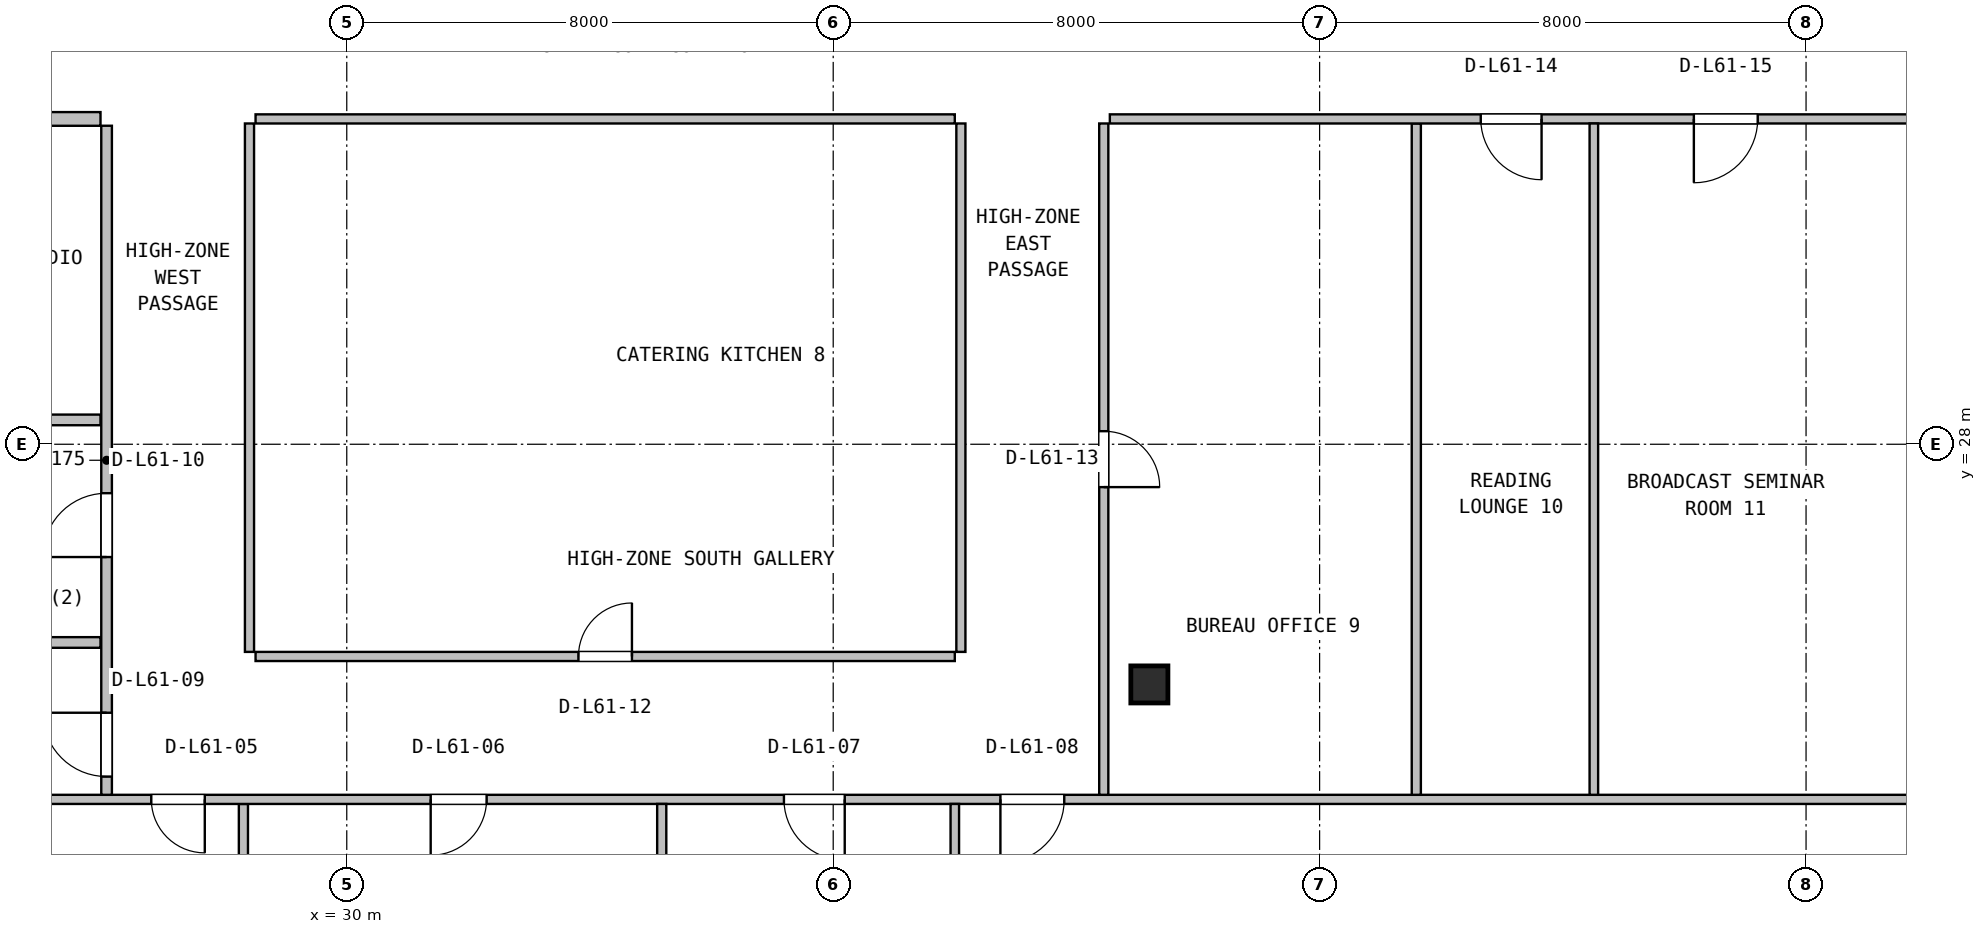
"""IFC4 building model, lengths in metres.
Left out: names, types, materials, properties, quantities, classifications, styles, units other than length and angle.
Written with IfcOpenShell. Run it as: python <this file> out.ifc"""

import sys

from ifc_helpers import new_model, si_unit, direction, frame, frame_2d, origin, origin_2d, place, context, subcontext, project, spatial, rectangle, hollow_circle, extrude, source, transform, mapped, element, fill, save


model = new_model("IFC4")
c1 = context("Model", 3, precision=1e-05, world=origin(), true_north=direction((0.0, 1.0)))
c2 = subcontext(c1, "Body", "Model", "MODEL_VIEW")
j1 = project(units=[si_unit("LENGTHUNIT", "METRE"), si_unit("PLANEANGLEUNIT", "RADIAN")], contexts=[c1])
p1 = place(None, origin())
s1 = spatial("IfcSite", under=j1, at=p1, CompositionType="ELEMENT")
p2 = place(p1, origin())
s2 = spatial("IfcBuilding", under=s1, at=p2, CompositionType="ELEMENT")
p3 = place(p2, frame((0.0, 0.0, 247.0)))
s3 = spatial("IfcBuildingStorey", under=s2, at=p3, CompositionType="ELEMENT", Elevation=247.0)
m1 = source(origin(), c2, "Body", "SweptSolid", [
    extrude(hollow_circle(Radius=0.305, WallThickness=0.025, at=origin_2d()), origin(), (0.0, 0.0, 1.0), 3.8),
])
p4 = place(p3, frame((43.2, 24.05, 0.0), z_axis=(0.0, 0.0, 1.0), x_axis=(1.0, 0.0, 0.0)))
e1 = element("IfcColumn", 1, at=p4, inside=s3, PredefinedType="COLUMN", context=c2, shape_type="MappedRepresentation", body=[
    mapped(m1, transform((0.0, 0.0, 0.0), x_axis=(1.0, 0.0, 0.0), y_axis=(0.0, 1.0, 0.0), z_axis=(0.0, 0.0, 1.0), scale=1.0)),
])
p5 = place(p3, frame((28.3, 10.38, 0.0), z_axis=(0.0, 0.0, 1.0), x_axis=(0.0, 1.0, 0.0)))
e2 = element("IfcWall", 2, at=p5, inside=s3, PredefinedType="PARTITIONING", context=c2, shape_type="SweptSolid", body=[
    extrude(rectangle(XDim=11.705, YDim=0.15, at=frame_2d((5.853, 0.0))), origin(), (0.0, 0.0, 1.0), 2.908),
])
p6 = place(p3, frame((9.68, 22.16, 0.0), z_axis=(0.0, 0.0, 1.0), x_axis=(1.0, 0.0, 0.0)))
e3 = element("IfcWall", 3, at=p6, inside=s3, PredefinedType="PARTITIONING", context=c2, shape_type="SweptSolid", body=[
    extrude(rectangle(XDim=48.64, YDim=0.15, at=frame_2d((24.32, 0.0))), origin(), (0.0, 0.0, 1.0), 2.908),
])
p7 = place(p6, frame((17.105, 0.0, 0.0)))
e4 = element("IfcOpeningElement", 4, at=p7, cuts=e3, PredefinedType="OPENING", context=c2, shape_type="SweptSolid", body=[
    extrude(rectangle(XDim=0.88, YDim=2.06, at=frame_2d((0.44, 1.03))), frame((0.0, 0.085, 0.0), z_axis=(0.0, -1.0, 0.0), x_axis=(1.0, 0.0, 0.0)), (0.0, 0.0, 1.0), 0.17),
])
p8 = place(p6, frame((21.7, 0.0, 0.0)))
e5 = element("IfcOpeningElement", 5, at=p8, cuts=e3, PredefinedType="OPENING", context=c2, shape_type="SweptSolid", body=[
    extrude(rectangle(XDim=0.92, YDim=2.08, at=frame_2d((0.46, 1.04))), frame((0.0, 0.085, 0.0), z_axis=(0.0, -1.0, 0.0), x_axis=(1.0, 0.0, 0.0)), (0.0, 0.0, 1.0), 0.17),
])
p9 = place(p6, frame((27.51, 0.0, 0.0)))
e6 = element("IfcOpeningElement", 6, at=p9, cuts=e3, PredefinedType="OPENING", context=c2, shape_type="SweptSolid", body=[
    extrude(rectangle(XDim=1.0, YDim=2.1, at=frame_2d((0.5, 1.05))), frame((0.0, 0.085, 0.0), z_axis=(0.0, -1.0, 0.0), x_axis=(1.0, 0.0, 0.0)), (0.0, 0.0, 1.0), 0.17),
])
p10 = place(p6, frame((31.07, 0.0, 0.0)))
e7 = element("IfcOpeningElement", 7, at=p10, cuts=e3, PredefinedType="OPENING", context=c2, shape_type="SweptSolid", body=[
    extrude(rectangle(XDim=1.05, YDim=2.1, at=frame_2d((0.525, 1.05))), frame((0.0, 0.085, 0.0), z_axis=(0.0, -1.0, 0.0), x_axis=(1.0, 0.0, 0.0)), (0.0, 0.0, 1.0), 0.17),
])
p11 = place(p3, frame((35.18, 10.38, 0.0), z_axis=(0.0, 0.0, 1.0), x_axis=(0.0, 1.0, 0.0)))
e8 = element("IfcWall", 8, at=p11, inside=s3, PredefinedType="PARTITIONING", context=c2, shape_type="SweptSolid", body=[
    extrude(rectangle(XDim=11.705, YDim=0.15, at=frame_2d((5.853, 0.0))), origin(), (0.0, 0.0, 1.0), 3.171),
])
p12 = place(p3, frame((40.0, 10.38, 0.0), z_axis=(0.0, 0.0, 1.0), x_axis=(0.0, 1.0, 0.0)))
e9 = element("IfcWall", 9, at=p12, inside=s3, PredefinedType="PARTITIONING", context=c2, shape_type="SweptSolid", body=[
    extrude(rectangle(XDim=11.705, YDim=0.14, at=frame_2d((5.853, 0.0))), origin(), (0.0, 0.0, 1.0), 3.171),
])
p13 = place(p3, frame((26.05, 22.235, 0.0), z_axis=(0.0, 0.0, 1.0), x_axis=(0.0, 1.0, 0.0)))
e10 = element("IfcWall", 10, at=p13, inside=s3, PredefinedType="PARTITIONING", context=c2, shape_type="SweptSolid", body=[
    extrude(rectangle(XDim=11.003, YDim=0.175, at=frame_2d((5.501, 0.0))), origin(), (0.0, 0.0, 1.0), 2.908),
])
p14 = place(p13, frame((0.3, 0.0, 0.0)))
e11 = element("IfcOpeningElement", 11, at=p14, cuts=e10, PredefinedType="OPENING", context=c2, shape_type="SweptSolid", body=[
    extrude(rectangle(XDim=1.05, YDim=2.1, at=frame_2d((0.525, 1.05))), frame((0.0, 0.098, 0.0), z_axis=(0.0, -1.0, 0.0), x_axis=(1.0, 0.0, 0.0)), (0.0, 0.0, 1.0), 0.195),
])
p15 = place(p13, frame((3.91, 0.0, 0.0)))
e12 = element("IfcOpeningElement", 12, at=p15, cuts=e10, PredefinedType="OPENING", context=c2, shape_type="SweptSolid", body=[
    extrude(rectangle(XDim=1.05, YDim=2.1, at=frame_2d((0.525, 1.05))), frame((0.0, 0.098, 0.0), z_axis=(0.0, -1.0, 0.0), x_axis=(1.0, 0.0, 0.0)), (0.0, 0.0, 1.0), 0.195),
])
for number, where, z_axis, x_axis in (
    (13, (9.68, 24.74, 0.0), (0.0, 0.0, 1.0), (1.0, 0.0, 0.0)),
    (14, (9.68, 28.4, 0.0), (0.0, 0.0, 1.0), (1.0, 0.0, 0.0)),
):
    element("IfcWall", number, at=place(p3, frame(where, z_axis=z_axis, x_axis=x_axis)), inside=s3, PredefinedType="PARTITIONING", context=c2, shape_type="SweptSolid", body=[
        extrude(rectangle(XDim=16.27, YDim=0.175, at=frame_2d((8.135, 0.0))), origin(), (0.0, 0.0, 1.0), 2.908),
    ])
p16 = place(p3, frame((9.68, 33.35, 0.0), z_axis=(0.0, 0.0, 1.0), x_axis=(1.0, 0.0, 0.0)))
e15 = element("IfcWall", 15, at=p16, inside=s3, PredefinedType="PARTITIONING", context=c2, shape_type="SweptSolid", body=[
    extrude(rectangle(XDim=16.27, YDim=0.225, at=frame_2d((8.135, 0.0))), origin(), (0.0, 0.0, 1.0), 2.908),
])
p17 = place(p16, frame((9.27, 0.0, 0.0)))
e16 = element("IfcOpeningElement", 16, at=p17, cuts=e15, PredefinedType="OPENING", context=c2, shape_type="SweptSolid", body=[
    extrude(rectangle(XDim=1.4, YDim=2.12, at=frame_2d((0.7, 1.06))), frame((0.0, 0.123, 0.0), z_axis=(0.0, -1.0, 0.0), x_axis=(1.0, 0.0, 0.0)), (0.0, 0.0, 1.0), 0.245),
])
p18 = place(p3, frame((28.5, 24.51, 0.0), z_axis=(0.0, 0.0, 1.0), x_axis=(1.0, 0.0, 0.0)))
e17 = element("IfcWall", 17, at=p18, inside=s3, PredefinedType="PARTITIONING", context=c2, shape_type="SweptSolid", body=[
    extrude(rectangle(XDim=11.5, YDim=0.15, at=frame_2d((5.75, 0.0))), origin(), (0.0, 0.0, 1.0), 2.908),
])
p19 = place(p18, frame((5.31, 0.0, 0.0)))
e18 = element("IfcOpeningElement", 18, at=p19, cuts=e17, PredefinedType="OPENING", context=c2, shape_type="SweptSolid", body=[
    extrude(rectangle(XDim=0.88, YDim=2.06, at=frame_2d((0.44, 1.03))), frame((0.0, 0.085, 0.0), z_axis=(0.0, -1.0, 0.0), x_axis=(1.0, 0.0, 0.0)), (0.0, 0.0, 1.0), 0.17),
])
p20 = place(p3, frame((40.1, 24.585, 0.0), z_axis=(0.0, 0.0, 1.0), x_axis=(0.0, 1.0, 0.0)))
e19 = element("IfcWall", 19, at=p20, inside=s3, PredefinedType="PARTITIONING", context=c2, shape_type="SweptSolid", body=[
    extrude(rectangle(XDim=8.69, YDim=0.15, at=frame_2d((4.345, 0.0))), origin(), (0.0, 0.0, 1.0), 3.222),
])
p21 = place(p3, frame((28.5, 33.35, 0.0), z_axis=(0.0, 0.0, 1.0), x_axis=(1.0, 0.0, 0.0)))
e20 = element("IfcWall", 20, at=p21, inside=s3, PredefinedType="PARTITIONING", context=c2, shape_type="SweptSolid", body=[
    extrude(rectangle(XDim=11.5, YDim=0.15, at=frame_2d((5.75, 0.0))), origin(), (0.0, 0.0, 1.0), 2.908),
])
p22 = place(p3, frame((28.4, 24.585, 0.0), z_axis=(0.0, 0.0, 1.0), x_axis=(0.0, 1.0, 0.0)))
e21 = element("IfcWall", 21, at=p22, inside=s3, PredefinedType="PARTITIONING", context=c2, shape_type="SweptSolid", body=[
    extrude(rectangle(XDim=8.69, YDim=0.15, at=frame_2d((4.345, 0.0))), origin(), (0.0, 0.0, 1.0), 3.222),
])
p23 = place(p3, frame((47.59, 22.235, 0.0), z_axis=(0.0, 0.0, 1.0), x_axis=(0.0, 1.0, 0.0)))
e22 = element("IfcWall", 22, at=p23, inside=s3, PredefinedType="PARTITIONING", context=c2, shape_type="SweptSolid", body=[
    extrude(rectangle(XDim=11.04, YDim=0.15, at=frame_2d((5.52, 0.0))), origin(), (0.0, 0.0, 1.0), 3.222),
])
p24 = place(p3, frame((42.55, 33.35, 0.0), z_axis=(0.0, 0.0, 1.0), x_axis=(1.0, 0.0, 0.0)))
e23 = element("IfcWall", 23, at=p24, inside=s3, PredefinedType="PARTITIONING", context=c2, shape_type="SweptSolid", body=[
    extrude(rectangle(XDim=15.77, YDim=0.15, at=frame_2d((7.885, 0.0))), origin(), (0.0, 0.0, 1.0), 2.908),
])
p25 = place(p24, frame((6.1, 0.0, 0.0)))
e24 = element("IfcOpeningElement", 24, at=p25, cuts=e23, PredefinedType="OPENING", context=c2, shape_type="SweptSolid", body=[
    extrude(rectangle(XDim=1.0, YDim=2.1, at=frame_2d((0.5, 1.05))), frame((0.0, 0.085, 0.0), z_axis=(0.0, -1.0, 0.0), x_axis=(1.0, 0.0, 0.0)), (0.0, 0.0, 1.0), 0.17),
])
p26 = place(p24, frame((9.605, 0.0, 0.0)))
e25 = element("IfcOpeningElement", 25, at=p26, cuts=e23, PredefinedType="OPENING", context=c2, shape_type="SweptSolid", body=[
    extrude(rectangle(XDim=1.05, YDim=2.1, at=frame_2d((0.525, 1.05))), frame((0.0, 0.085, 0.0), z_axis=(0.0, -1.0, 0.0), x_axis=(1.0, 0.0, 0.0)), (0.0, 0.0, 1.0), 0.17),
])
p27 = place(p3, frame((42.45, 22.235, 0.0), z_axis=(0.0, 0.0, 1.0), x_axis=(0.0, 1.0, 0.0)))
e26 = element("IfcWall", 26, at=p27, inside=s3, PredefinedType="PARTITIONING", context=c2, shape_type="SweptSolid", body=[
    extrude(rectangle(XDim=11.04, YDim=0.15, at=frame_2d((5.52, 0.0))), origin(), (0.0, 0.0, 1.0), 2.908),
])
p28 = place(p27, frame((5.06, 0.0, 0.0)))
e27 = element("IfcOpeningElement", 27, at=p28, cuts=e26, PredefinedType="OPENING", context=c2, shape_type="SweptSolid", body=[
    extrude(rectangle(XDim=0.92, YDim=2.08, at=frame_2d((0.46, 1.04))), frame((0.0, 0.085, 0.0), z_axis=(0.0, -1.0, 0.0), x_axis=(1.0, 0.0, 0.0)), (0.0, 0.0, 1.0), 0.17),
])
p29 = place(p3, frame((50.51, 22.235, 0.0), z_axis=(0.0, 0.0, 1.0), x_axis=(0.0, 1.0, 0.0)))
e28 = element("IfcWall", 28, at=p29, inside=s3, PredefinedType="PARTITIONING", context=c2, shape_type="SweptSolid", body=[
    extrude(rectangle(XDim=11.04, YDim=0.14, at=frame_2d((5.52, 0.0))), origin(), (0.0, 0.0, 1.0), 3.222),
])
m2 = source(origin(), c2, "Body", "SweptSolid", [
    extrude(rectangle(XDim=0.88, YDim=2.06, at=frame_2d((0.44, 1.03))), frame((0.0, 0.025, 0.0), z_axis=(0.0, -1.0, 0.0), x_axis=(1.0, 0.0, 0.0)), (0.0, 0.0, 1.0), 0.05),
])
p30 = place(p7, frame((0.88, 0.0, 0.0), z_axis=(0.0, 0.0, 1.0), x_axis=(-1.0, 0.0, 0.0)))
e29 = element("IfcDoor", 29, at=p30, inside=s3, OperationType="SINGLE_SWING_RIGHT", PredefinedType="DOOR", context=c2, shape_type="MappedRepresentation", body=[
    mapped(m2, transform((0.0, 0.0, 0.0), x_axis=(1.0, 0.0, 0.0), y_axis=(0.0, 1.0, 0.0), z_axis=(0.0, 0.0, 1.0), scale=1.0)),
])
fill(e4, e29)
m3 = source(origin(), c2, "Body", "SweptSolid", [
    extrude(rectangle(XDim=0.92, YDim=2.08, at=frame_2d((0.46, 1.04))), frame((0.0, 0.025, 0.0), z_axis=(0.0, -1.0, 0.0), x_axis=(1.0, 0.0, 0.0)), (0.0, 0.0, 1.0), 0.05),
])
p31 = place(p8, frame((0.92, 0.0, 0.0), z_axis=(0.0, 0.0, 1.0), x_axis=(-1.0, 0.0, 0.0)))
e30 = element("IfcDoor", 30, at=p31, inside=s3, OperationType="SINGLE_SWING_LEFT", PredefinedType="DOOR", context=c2, shape_type="MappedRepresentation", body=[
    mapped(m3, transform((0.0, 0.0, 0.0), x_axis=(1.0, 0.0, 0.0), y_axis=(0.0, 1.0, 0.0), z_axis=(0.0, 0.0, 1.0), scale=1.0)),
])
fill(e5, e30)
m4 = source(origin(), c2, "Body", "SweptSolid", [
    extrude(rectangle(XDim=1.0, YDim=2.1, at=frame_2d((0.5, 1.05))), frame((0.0, 0.025, 0.0), z_axis=(0.0, -1.0, 0.0), x_axis=(1.0, 0.0, 0.0)), (0.0, 0.0, 1.0), 0.05),
])
p32 = place(p9, frame((1.0, 0.0, 0.0), z_axis=(0.0, 0.0, 1.0), x_axis=(-1.0, 0.0, 0.0)))
e31 = element("IfcDoor", 31, at=p32, inside=s3, OperationType="SINGLE_SWING_RIGHT", PredefinedType="DOOR", context=c2, shape_type="MappedRepresentation", body=[
    mapped(m4, transform((0.0, 0.0, 0.0), x_axis=(1.0, 0.0, 0.0), y_axis=(0.0, 1.0, 0.0), z_axis=(0.0, 0.0, 1.0), scale=1.0)),
])
fill(e6, e31)
m5 = source(origin(), c2, "Body", "SweptSolid", [
    extrude(rectangle(XDim=1.05, YDim=2.1, at=frame_2d((0.525, 1.05))), frame((0.0, 0.025, 0.0), z_axis=(0.0, -1.0, 0.0), x_axis=(1.0, 0.0, 0.0)), (0.0, 0.0, 1.0), 0.05),
])
p33 = place(p10, frame((1.05, 0.0, 0.0), z_axis=(0.0, 0.0, 1.0), x_axis=(-1.0, 0.0, 0.0)))
e32 = element("IfcDoor", 32, at=p33, inside=s3, OperationType="SINGLE_SWING_LEFT", PredefinedType="DOOR", context=c2, shape_type="MappedRepresentation", body=[
    mapped(m5, transform((0.0, 0.0, 0.0), x_axis=(1.0, 0.0, 0.0), y_axis=(0.0, 1.0, 0.0), z_axis=(0.0, 0.0, 1.0), scale=1.0)),
])
fill(e7, e32)
p34 = place(p14, origin())
e33 = element("IfcDoor", 33, at=p34, inside=s3, OperationType="SINGLE_SWING_RIGHT", PredefinedType="DOOR", context=c2, shape_type="MappedRepresentation", body=[
    mapped(m5, transform((0.0, 0.0, 0.0), x_axis=(1.0, 0.0, 0.0), y_axis=(0.0, 1.0, 0.0), z_axis=(0.0, 0.0, 1.0), scale=1.0)),
])
fill(e11, e33)
p35 = place(p15, origin())
e34 = element("IfcDoor", 34, at=p35, inside=s3, OperationType="SINGLE_SWING_LEFT", PredefinedType="DOOR", context=c2, shape_type="MappedRepresentation", body=[
    mapped(m5, transform((0.0, 0.0, 0.0), x_axis=(1.0, 0.0, 0.0), y_axis=(0.0, 1.0, 0.0), z_axis=(0.0, 0.0, 1.0), scale=1.0)),
])
fill(e12, e34)
p36 = place(p19, origin())
e35 = element("IfcDoor", 35, at=p36, inside=s3, OperationType="SINGLE_SWING_RIGHT", PredefinedType="DOOR", context=c2, shape_type="MappedRepresentation", body=[
    mapped(m2, transform((0.0, 0.0, 0.0), x_axis=(1.0, 0.0, 0.0), y_axis=(0.0, 1.0, 0.0), z_axis=(0.0, 0.0, 1.0), scale=1.0)),
])
fill(e18, e35)
p37 = place(p28, frame((0.92, 0.0, 0.0), z_axis=(0.0, 0.0, 1.0), x_axis=(-1.0, 0.0, 0.0)))
e36 = element("IfcDoor", 36, at=p37, inside=s3, OperationType="SINGLE_SWING_LEFT", PredefinedType="DOOR", context=c2, shape_type="MappedRepresentation", body=[
    mapped(m3, transform((0.0, 0.0, 0.0), x_axis=(1.0, 0.0, 0.0), y_axis=(0.0, 1.0, 0.0), z_axis=(0.0, 0.0, 1.0), scale=1.0)),
])
fill(e27, e36)
p38 = place(p25, frame((1.0, 0.0, 0.0), z_axis=(0.0, 0.0, 1.0), x_axis=(-1.0, 0.0, 0.0)))
e37 = element("IfcDoor", 37, at=p38, inside=s3, OperationType="SINGLE_SWING_RIGHT", PredefinedType="DOOR", context=c2, shape_type="MappedRepresentation", body=[
    mapped(m4, transform((0.0, 0.0, 0.0), x_axis=(1.0, 0.0, 0.0), y_axis=(0.0, 1.0, 0.0), z_axis=(0.0, 0.0, 1.0), scale=1.0)),
])
fill(e24, e37)
p39 = place(p26, frame((1.05, 0.0, 0.0), z_axis=(0.0, 0.0, 1.0), x_axis=(-1.0, 0.0, 0.0)))
e38 = element("IfcDoor", 38, at=p39, inside=s3, OperationType="SINGLE_SWING_LEFT", PredefinedType="DOOR", context=c2, shape_type="MappedRepresentation", body=[
    mapped(m5, transform((0.0, 0.0, 0.0), x_axis=(1.0, 0.0, 0.0), y_axis=(0.0, 1.0, 0.0), z_axis=(0.0, 0.0, 1.0), scale=1.0)),
])
fill(e25, e38)
save(model, sys.argv[1])
